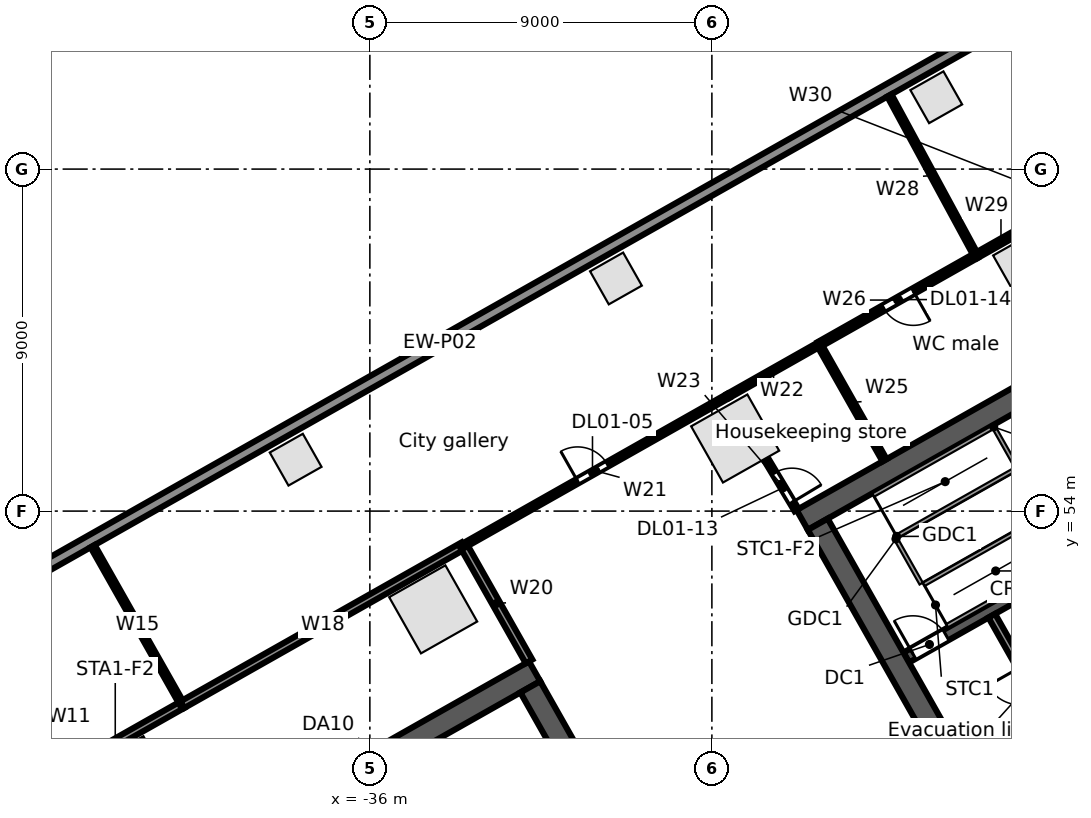
"""IFC4 building model, lengths in metres.
Left out: names, types, materials, properties, quantities, classifications, styles, units other than length and angle.
Written with IfcOpenShell. Run it as: python <this file> out.ifc"""

import sys

from ifc_helpers import new_model, si_unit, direction, frame, frame_2d, origin, origin_2d, place, context, subcontext, project, spatial, rectangle, extrude, element, fill, save


model = new_model("IFC4")
c1 = context("Model", 3, precision=1e-05, world=origin(), true_north=direction((0.0, 1.0)))
c2 = subcontext(c1, "Body", "Model", "MODEL_VIEW")
j1 = project(units=[si_unit("LENGTHUNIT", "METRE"), si_unit("PLANEANGLEUNIT", "RADIAN")], contexts=[c1])
p1 = place(None, origin())
s1 = spatial("IfcSite", under=j1, at=p1, CompositionType="ELEMENT")
p2 = place(p1, origin())
s2 = spatial("IfcBuilding", under=s1, at=p2, CompositionType="ELEMENT")
p3 = place(p2, frame((0.0, 0.0, 6.5)))
s3 = spatial("IfcBuildingStorey", under=s2, at=p3, CompositionType="ELEMENT", Elevation=6.5)
for number, where, z_axis, x_axis in (
    (1, (-18.441, 60.406, 0.0), (0.0, 0.0, 1.0), (-0.87, -0.492, 0.0)),
    (2, (-26.388, 55.91, 0.0), (0.0, 0.0, 1.0), (-0.87, -0.492, 0.0)),
    (3, (-34.334, 51.414, 0.0), (0.0, 0.0, 1.0), (-0.87, -0.492, 0.0)),
    (4, (-42.28, 46.919, 0.0), (0.0, 0.0, 1.0), (-0.87, -0.492, 0.0)),
):
    element("IfcColumn", number, at=place(p3, frame(where, z_axis=z_axis, x_axis=x_axis)), inside=s3, PredefinedType="COLUMN", context=c2, shape_type="SweptSolid", body=[
        extrude(rectangle(XDim=1.7, YDim=1.7, at=origin_2d()), origin(), (0.0, 0.0, 1.0), 5.0),
    ])
for number, where, z_axis, x_axis in (
    (5, (-21.096, 64.89, 0.0), (0.0, 0.0, 1.0), (-0.87, -0.492, 0.0)),
    (6, (-29.524, 60.122, 0.0), (0.0, 0.0, 1.0), (-0.87, -0.492, 0.0)),
    (7, (-37.953, 55.353, 0.0), (0.0, 0.0, 1.0), (-0.87, -0.492, 0.0)),
):
    element("IfcColumn", number, at=place(p3, frame(where, z_axis=z_axis, x_axis=x_axis)), inside=s3, PredefinedType="COLUMN", context=c2, shape_type="SweptSolid", body=[
        extrude(rectangle(XDim=1.0, YDim=1.0, at=origin_2d()), origin(), (0.0, 0.0, 1.0), 5.0),
    ])
p4 = place(p3, frame((-63.707, 41.701, 0.0), z_axis=(0.0, 0.0, 1.0), x_axis=(0.870355510268, 0.492423888277, 0.0)))
e8 = element("IfcWall", 8, at=p4, inside=s3, PredefinedType="STANDARD", context=c2, shape_type="SweptSolid", body=[
    extrude(rectangle(XDim=67.903, YDim=0.3, at=frame_2d((33.952, 0.0))), origin(), (0.0, 0.0, 1.0), 4.65),
])
p5 = place(p3, frame((-46.461, 41.412, 0.0), z_axis=(0.0, 0.0, 1.0), x_axis=(0.870350116061, 0.492433422375, 0.0)))
e9 = element("IfcWall", 9, at=p5, inside=s3, PredefinedType="SOLIDWALL", context=c2, shape_type="SweptSolid", body=[
    extrude(rectangle(XDim=17.0, YDim=0.6, at=frame_2d((8.5, 0.0))), origin(), (0.0, 0.0, 1.0), 4.65),
])
p6 = place(p3, frame((-31.778, 49.374, 0.0), z_axis=(0.0, 0.0, 1.0), x_axis=(0.492433046652, -0.870350328641, 0.0)))
e10 = element("IfcWall", 10, at=p6, inside=s3, PredefinedType="SOLIDWALL", context=c2, shape_type="SweptSolid", body=[
    extrude(rectangle(XDim=12.8, YDim=0.6, at=frame_2d((6.4, 0.0))), origin(), (0.0, 0.0, 1.0), 4.65),
])
p7 = place(p3, frame((-19.718, 46.316, 0.0), z_axis=(0.0, 0.0, 1.0), x_axis=(0.870353963862, 0.492426621528, 0.0)))
e11 = element("IfcWall", 11, at=p7, inside=s3, PredefinedType="SOLIDWALL", context=c2, shape_type="SweptSolid", body=[
    extrude(rectangle(XDim=4.9, YDim=0.3, at=frame_2d((2.45, 0.0))), origin(), (0.0, 0.0, 1.0), 4.65),
])
p8 = place(p7, frame((0.55, 0.0, 0.0)))
e12 = element("IfcOpeningElement", 12, at=p8, cuts=e11, PredefinedType="OPENING", context=c2, shape_type="SweptSolid", body=[
    extrude(rectangle(XDim=1.1, YDim=2.1, at=frame_2d((0.55, 1.05))), frame((0.0, 0.16, 0.0), z_axis=(0.0, -1.0, 0.0), x_axis=(1.0, 0.0, 0.0)), (0.0, 0.0, 1.0), 0.32),
])
p9 = place(p7, frame((3.65, 0.0, 0.0)))
e13 = element("IfcOpeningElement", 13, at=p9, cuts=e11, PredefinedType="OPENING", context=c2, shape_type="SweptSolid", body=[
    extrude(rectangle(XDim=0.9, YDim=2.1, at=frame_2d((0.45, 1.05))), frame((0.0, 0.16, 0.0), z_axis=(0.0, -1.0, 0.0), x_axis=(1.0, 0.0, 0.0)), (0.0, 0.0, 1.0), 0.32),
])
p10 = place(p3, frame((-21.885, 50.146, 0.0), z_axis=(0.0, 0.0, 1.0), x_axis=(0.870359411463, 0.492416992881, 0.0)))
e14 = element("IfcWall", 14, at=p10, inside=s3, PredefinedType="SOLIDWALL", context=c2, shape_type="SweptSolid", body=[
    extrude(rectangle(XDim=7.2, YDim=0.3, at=frame_2d((3.6, 0.0))), origin(), (0.0, 0.0, 1.0), 4.65),
])
p11 = place(p10, frame((0.2, 0.0, 0.0)))
e15 = element("IfcOpeningElement", 15, at=p11, cuts=e14, PredefinedType="OPENING", context=c2, shape_type="SweptSolid", body=[
    extrude(rectangle(XDim=1.0, YDim=2.1, at=frame_2d((0.5, 1.05))), frame((0.0, 0.16, 0.0), z_axis=(0.0, -1.0, 0.0), x_axis=(1.0, 0.0, 0.0)), (0.0, 0.0, 1.0), 0.32),
])
p12 = place(p3, frame((-24.623, 53.767, 0.0), z_axis=(0.0, 0.0, 1.0), x_axis=(0.870356627484, 0.492421913601, 0.0)))
e16 = element("IfcWall", 16, at=p12, inside=s3, PredefinedType="SOLIDWALL", context=c2, shape_type="SweptSolid", body=[
    extrude(rectangle(XDim=15.0, YDim=0.6, at=frame_2d((7.5, 0.0))), origin(), (0.0, 0.0, 1.0), 4.65),
])
p13 = place(p3, frame((-24.214, 53.654, 0.0), z_axis=(0.0, 0.0, 1.0), x_axis=(0.492441221355, -0.870345703448, 0.0)))
e17 = element("IfcWall", 17, at=p13, inside=s3, PredefinedType="SOLIDWALL", context=c2, shape_type="SweptSolid", body=[
    extrude(rectangle(XDim=12.8, YDim=0.6, at=frame_2d((6.4, 0.0))), origin(), (0.0, 0.0, 1.0), 4.65),
])
p14 = place(p3, frame((-19.635, 51.246, 0.0), z_axis=(0.0, 0.0, 1.0), x_axis=(0.492408451753, -0.87036424366, 0.0)))
e18 = element("IfcWall", 18, at=p14, inside=s3, PredefinedType="PARTITIONING", context=c2, shape_type="SweptSolid", body=[
    extrude(rectangle(XDim=4.1, YDim=0.2, at=frame_2d((2.05, 0.0))), origin(), (0.0, 0.0, 1.0), 4.65),
])
p15 = place(p14, frame((1.55, 0.0, 0.0)))
e19 = element("IfcOpeningElement", 19, at=p15, cuts=e18, PredefinedType="OPENING", context=c2, shape_type="SweptSolid", body=[
    extrude(rectangle(XDim=1.0, YDim=2.1, at=frame_2d((0.5, 1.05))), frame((0.0, 0.11, 0.0), z_axis=(0.0, -1.0, 0.0), x_axis=(1.0, 0.0, 0.0)), (0.0, 0.0, 1.0), 0.22),
])
p16 = place(p3, frame((-48.332, 44.719, 0.0), z_axis=(0.0, 0.0, 1.0), x_axis=(0.870331650579, 0.492466057713, 0.0)))
e20 = element("IfcWall", 20, at=p16, inside=s3, PredefinedType="PARTITIONING", context=c2, shape_type="SweptSolid", body=[
    extrude(rectangle(XDim=8.5, YDim=0.2, at=frame_2d((4.25, 0.0))), origin(), (0.0, 0.0, 1.0), 4.03),
])
p17 = place(p16, frame((3.45, 0.0, 0.0)))
e21 = element("IfcOpeningElement", 21, at=p17, cuts=e20, PredefinedType="OPENING", context=c2, shape_type="SweptSolid", body=[
    extrude(rectangle(XDim=1.8, YDim=2.1, at=frame_2d((0.9, 1.05))), frame((0.0, 0.11, 0.0), z_axis=(0.0, -1.0, 0.0), x_axis=(1.0, 0.0, 0.0)), (0.0, 0.0, 1.0), 0.22),
])
p18 = place(p3, frame((-43.295, 53.077, 0.0), z_axis=(0.0, 0.0, 1.0), x_axis=(0.492503605136, -0.87031040378, 0.0)))
e22 = element("IfcWall", 22, at=p18, inside=s3, PredefinedType="PARTITIONING", context=c2, shape_type="SweptSolid", body=[
    extrude(rectangle(XDim=4.793, YDim=0.125, at=frame_2d((2.397, 0.0))), origin(), (0.0, 0.0, 1.0), 3.93),
])
p19 = place(p3, frame((-40.934, 48.905, 0.0), z_axis=(0.0, 0.0, 1.0), x_axis=(0.870387854278, 0.492366716102, 0.0)))
e23 = element("IfcWall", 23, at=p19, inside=s3, PredefinedType="PARTITIONING", context=c2, shape_type="SweptSolid", body=[
    extrude(rectangle(XDim=8.5, YDim=0.2, at=frame_2d((4.25, 0.0))), origin(), (0.0, 0.0, 1.0), 4.03),
])
p20 = place(p3, frame((-33.536, 53.09, 0.0), z_axis=(0.0, 0.0, 1.0), x_axis=(0.492521469645, -0.870300294116, 0.0)))
e24 = element("IfcWall", 24, at=p20, inside=s3, PredefinedType="PARTITIONING", context=c2, shape_type="SweptSolid", body=[
    extrude(rectangle(XDim=3.5, YDim=0.2, at=frame_2d((1.75, 0.0))), origin(), (0.0, 0.0, 1.0), 3.93),
])
p21 = place(p3, frame((-33.536, 53.09, 0.0), z_axis=(0.0, 0.0, 1.0), x_axis=(0.870327439455, 0.492473499928, 0.0)))
e25 = element("IfcWall", 25, at=p21, inside=s3, PredefinedType="PARTITIONING", context=c2, shape_type="SweptSolid", body=[
    extrude(rectangle(XDim=8.0, YDim=0.125, at=frame_2d((4.0, 0.0))), origin(), (0.0, 0.0, 1.0), 3.712),
])
p22 = place(p21, frame((3.45, 0.0, 0.0)))
e26 = element("IfcOpeningElement", 26, at=p22, cuts=e25, PredefinedType="OPENING", context=c2, shape_type="SweptSolid", body=[
    extrude(rectangle(XDim=0.9, YDim=2.1, at=frame_2d((0.45, 1.05))), frame((0.0, 0.073, 0.0), z_axis=(0.0, -1.0, 0.0), x_axis=(1.0, 0.0, 0.0)), (0.0, 0.0, 1.0), 0.145),
])
p23 = place(p3, frame((-26.573, 57.03, 0.0), z_axis=(0.0, 0.0, 1.0), x_axis=(0.870344460795, 0.492443417626, 0.0)))
e27 = element("IfcWall", 27, at=p23, inside=s3, PredefinedType="PARTITIONING", context=c2, shape_type="SweptSolid", body=[
    extrude(rectangle(XDim=2.75, YDim=0.125, at=frame_2d((1.375, 0.0))), origin(), (0.0, 0.0, 1.0), 4.65),
])
p24 = place(p3, frame((-25.587, 55.387, 0.0), z_axis=(0.0, 0.0, 1.0), x_axis=(0.514767546849, -0.857329792268, 0.0)))
e28 = element("IfcWall", 28, at=p24, inside=s3, PredefinedType="PARTITIONING", context=c2, shape_type="SweptSolid", body=[
    extrude(rectangle(XDim=1.585, YDim=0.125, at=frame_2d((0.792, 0.0))), origin(), (0.0, 0.0, 1.0), 4.65),
])
p25 = place(p24, frame((0.45, 0.0, 0.0)))
e29 = element("IfcOpeningElement", 29, at=p25, cuts=e28, PredefinedType="OPENING", context=c2, shape_type="SweptSolid", body=[
    extrude(rectangle(XDim=0.9, YDim=2.1, at=frame_2d((0.45, 1.05))), frame((0.0, 0.073, 0.0), z_axis=(0.0, -1.0, 0.0), x_axis=(1.0, 0.0, 0.0)), (0.0, 0.0, 1.0), 0.145),
])
p26 = place(p3, frame((-24.18, 58.384, 0.0), z_axis=(0.0, 0.0, 1.0), x_axis=(0.492521469645, -0.870300294116, 0.0)))
e30 = element("IfcWall", 30, at=p26, inside=s3, PredefinedType="PARTITIONING", context=c2, shape_type="SweptSolid", body=[
    extrude(rectangle(XDim=3.5, YDim=0.125, at=frame_2d((1.75, 0.0))), origin(), (0.0, 0.0, 1.0), 3.93),
])
p27 = place(p3, frame((-24.18, 58.384, 0.0), z_axis=(0.0, 0.0, 1.0), x_axis=(0.870360772617, 0.492414587, 0.0)))
e31 = element("IfcWall", 31, at=p27, inside=s3, PredefinedType="PARTITIONING", context=c2, shape_type="SweptSolid", body=[
    extrude(rectangle(XDim=4.75, YDim=0.15, at=frame_2d((2.375, 0.0))), origin(), (0.0, 0.0, 1.0), 4.65),
])
p28 = place(p27, frame((1.95, 0.0, 0.0)))
e32 = element("IfcOpeningElement", 32, at=p28, cuts=e31, PredefinedType="OPENING", context=c2, shape_type="SweptSolid", body=[
    extrude(rectangle(XDim=0.9, YDim=2.1, at=frame_2d((0.45, 1.05))), frame((0.0, 0.085, 0.0), z_axis=(0.0, -1.0, 0.0), x_axis=(1.0, 0.0, 0.0)), (0.0, 0.0, 1.0), 0.17),
])
p29 = place(p3, frame((-22.33, 64.939, 0.0), z_axis=(0.0, 0.0, 1.0), x_axis=(0.476360236723, -0.879250206067, 0.0)))
e33 = element("IfcWall", 33, at=p29, inside=s3, PredefinedType="PARTITIONING", context=c2, shape_type="SweptSolid", body=[
    extrude(rectangle(XDim=4.795, YDim=0.125, at=frame_2d((2.397, 0.0))), origin(), (0.0, 0.0, 1.0), 3.93),
])
p30 = place(p3, frame((-20.046, 60.723, 0.0), z_axis=(0.0, 0.0, 1.0), x_axis=(0.870308175411, 0.492507542899, 0.0)))
e34 = element("IfcWall", 34, at=p30, inside=s3, PredefinedType="PARTITIONING", context=c2, shape_type="SweptSolid", body=[
    extrude(rectangle(XDim=1.5, YDim=0.15, at=frame_2d((0.75, 0.0))), origin(), (0.0, 0.0, 1.0), 3.93),
])
p31 = place(p11, origin())
e35 = element("IfcDoor", 35, at=p31, inside=s3, OperationType="SINGLE_SWING_LEFT", PredefinedType="DOOR", context=c2, shape_type="SweptSolid", body=[
    extrude(rectangle(XDim=1.0, YDim=2.1, at=frame_2d((0.5, 1.05))), frame((0.0, 0.025, 0.0), z_axis=(0.0, -1.0, 0.0), x_axis=(1.0, 0.0, 0.0)), (0.0, 0.0, 1.0), 0.05),
])
fill(e15, e35)
p32 = place(p22, origin())
e36 = element("IfcDoor", 36, at=p32, inside=s3, OperationType="SINGLE_SWING_LEFT", PredefinedType="DOOR", context=c2, shape_type="SweptSolid", body=[
    extrude(rectangle(XDim=0.9, YDim=2.1, at=frame_2d((0.45, 1.05))), frame((0.0, 0.025, 0.0), z_axis=(0.0, -1.0, 0.0), x_axis=(1.0, 0.0, 0.0)), (0.0, 0.0, 1.0), 0.05),
])
fill(e26, e36)
p33 = place(p25, origin())
e37 = element("IfcDoor", 37, at=p33, inside=s3, OperationType="SINGLE_SWING_RIGHT", PredefinedType="DOOR", context=c2, shape_type="SweptSolid", body=[
    extrude(rectangle(XDim=0.9, YDim=2.1, at=frame_2d((0.45, 1.05))), frame((0.0, 0.025, 0.0), z_axis=(0.0, -1.0, 0.0), x_axis=(1.0, 0.0, 0.0)), (0.0, 0.0, 1.0), 0.05),
])
fill(e29, e37)
p34 = place(p28, frame((0.9, 0.0, 0.0), z_axis=(0.0, 0.0, 1.0), x_axis=(-1.0, 0.0, 0.0)))
e38 = element("IfcDoor", 38, at=p34, inside=s3, OperationType="SINGLE_SWING_LEFT", PredefinedType="DOOR", context=c2, shape_type="SweptSolid", body=[
    extrude(rectangle(XDim=0.9, YDim=2.1, at=frame_2d((0.45, 1.05))), frame((0.0, 0.025, 0.0), z_axis=(0.0, -1.0, 0.0), x_axis=(1.0, 0.0, 0.0)), (0.0, 0.0, 1.0), 0.05),
])
fill(e32, e38)
save(model, sys.argv[1])
